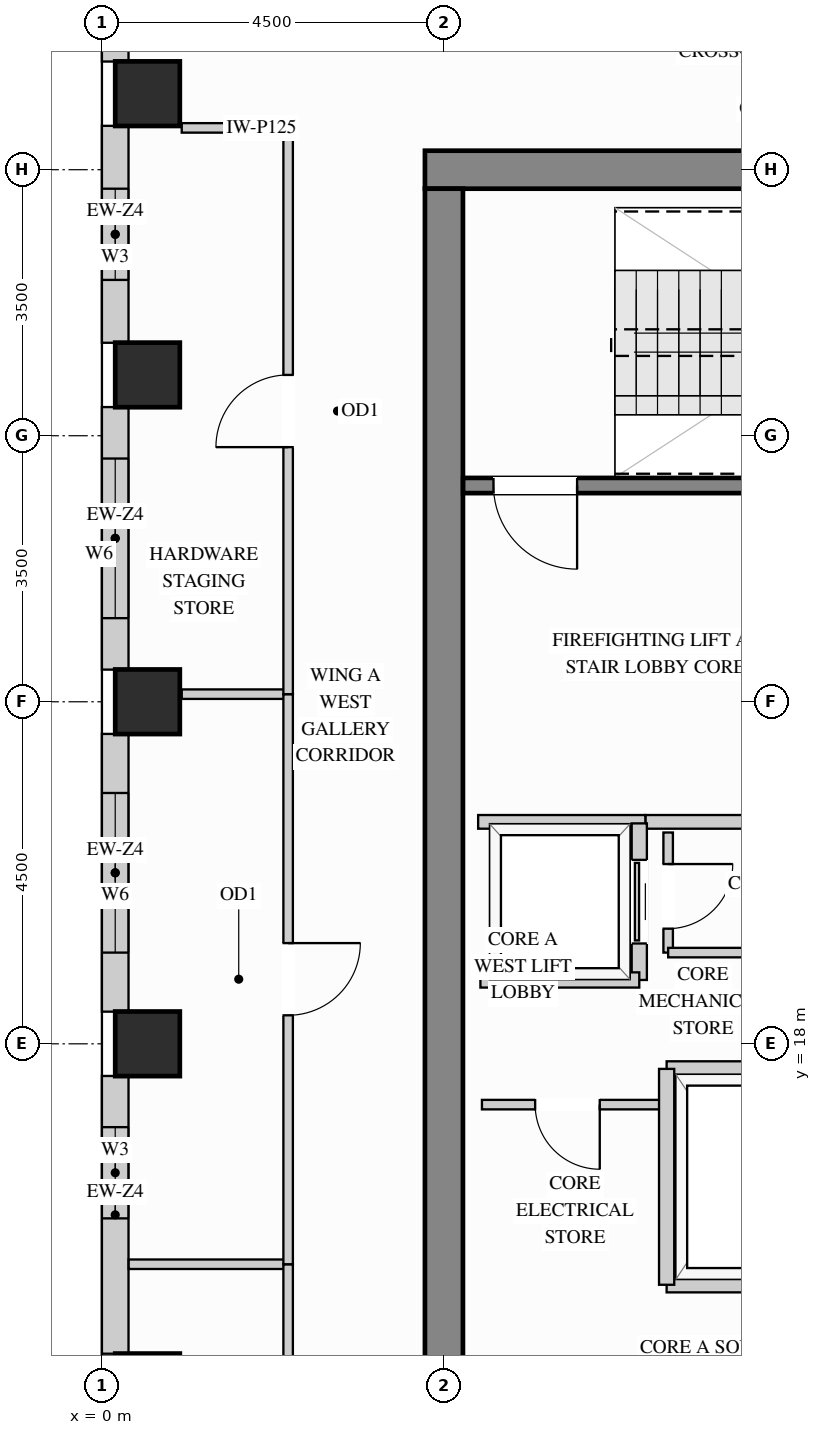
"""IFC4 building model, lengths in metres.
Left out: names, types, materials, properties, quantities, classifications, styles, units other than length and angle.
Written with IfcOpenShell. Run it as: python <this file> out.ifc"""

import sys

from ifc_helpers import new_model, si_unit, direction, frame, frame_2d, origin, origin_2d, place, context, subcontext, project, spatial, rectangle, extrude, source, transform, mapped, element, fill, save


model = new_model("IFC4")
c1 = context("Model", 3, precision=1e-05, world=origin(), true_north=direction((0.0, 1.0)))
c2 = subcontext(c1, "Body", "Model", "MODEL_VIEW")
j1 = project(units=[si_unit("LENGTHUNIT", "METRE"), si_unit("PLANEANGLEUNIT", "RADIAN")], contexts=[c1])
p1 = place(None, origin())
s1 = spatial("IfcSite", under=j1, at=p1, CompositionType="ELEMENT")
p2 = place(p1, origin())
s2 = spatial("IfcBuilding", under=s1, at=p2, CompositionType="ELEMENT")
p3 = place(p2, frame((0.0, 0.0, 273.6)))
s3 = spatial("IfcBuildingStorey", under=s2, at=p3, CompositionType="ELEMENT", Elevation=273.6)
m1 = source(origin(), c2, "Body", "SweptSolid", [
    extrude(rectangle(XDim=0.85, YDim=0.85, at=origin_2d()), origin(), (0.0, 0.0, 1.0), 3.37),
])
for number, where, z_axis, x_axis in (
    (1, (0.6, 13.5, 0.0), (0.0, 0.0, 1.0), (1.0, 0.0, 0.0)),
    (2, (0.6, 18.0, 0.0), (0.0, 0.0, 1.0), (1.0, 0.0, 0.0)),
    (3, (0.6, 22.5, 0.0), (0.0, 0.0, 1.0), (1.0, 0.0, 0.0)),
    (4, (0.6, 26.8, 0.0), (0.0, 0.0, 1.0), (1.0, 0.0, 0.0)),
    (5, (0.6, 30.5, 0.0), (0.0, 0.0, 1.0), (1.0, 0.0, 0.0)),
):
    element("IfcColumn", number, at=place(p3, frame(where, z_axis=z_axis, x_axis=x_axis)), inside=s3, PredefinedType="COLUMN", context=c2, shape_type="MappedRepresentation", body=[
        mapped(m1, transform((0.0, 0.0, 0.0), x_axis=(1.0, 0.0, 0.0), y_axis=(0.0, 1.0, 0.0), z_axis=(0.0, 0.0, 1.0))),
    ])
m2 = source(origin(), c2, "Body", "SweptSolid", [
    extrude(rectangle(XDim=10.5, YDim=0.5, at=frame_2d((5.25, 0.0))), origin(), (0.0, 0.0, 1.0), 3.37),
])
p4 = place(p3, frame((4.25, 29.5, 0.0), z_axis=(0.0, 0.0, 1.0), x_axis=(1.0, 0.0, 0.0)))
e6 = element("IfcWall", 6, at=p4, inside=s3, PredefinedType="SHEAR", context=c2, shape_type="MappedRepresentation", body=[
    mapped(m2, transform((0.0, 0.0, 0.0), x_axis=(1.0, 0.0, 0.0), y_axis=(0.0, 1.0, 0.0), z_axis=(0.0, 0.0, 1.0))),
])
m3 = source(origin(), c2, "Body", "SweptSolid", [
    extrude(rectangle(XDim=20.5, YDim=0.5, at=frame_2d((10.25, 0.0))), origin(), (0.0, 0.0, 1.0), 3.37),
])
p5 = place(p3, frame((4.5, 8.75, 0.0), z_axis=(0.0, 0.0, 1.0), x_axis=(0.0, 1.0, 0.0)))
e7 = element("IfcWall", 7, at=p5, inside=s3, PredefinedType="SHEAR", context=c2, shape_type="MappedRepresentation", body=[
    mapped(m3, transform((0.0, 0.0, 0.0), x_axis=(1.0, 0.0, 0.0), y_axis=(0.0, 1.0, 0.0), z_axis=(0.0, 0.0, 1.0))),
])
m4 = source(origin(), c2, "Body", "SweptSolid", [
    extrude(rectangle(XDim=0.527, YDim=0.35, at=frame_2d((0.263, 0.0))), origin(), (0.0, 0.0, 1.0), 3.355),
])
p6 = place(p3, frame((0.175, 31.45, 0.0), z_axis=(0.0, 0.0, 1.0), x_axis=(0.0, -1.0, 0.0)))
e8 = element("IfcWall", 8, at=p6, inside=s3, PredefinedType="SOLIDWALL", context=c2, shape_type="MappedRepresentation", body=[
    mapped(m4, transform((0.0, 0.0, 0.0), x_axis=(1.0, 0.0, 0.0), y_axis=(0.0, 1.0, 0.0), z_axis=(0.0, 0.0, 1.0))),
])
p7 = place(p3, frame((0.175, 30.077, 0.0), z_axis=(0.0, 0.0, 1.0), x_axis=(0.0, -1.0, 0.0)))
e9 = element("IfcWall", 9, at=p7, inside=s3, PredefinedType="SOLIDWALL", context=c2, shape_type="SweptSolid", body=[
    extrude(rectangle(XDim=2.854, YDim=0.35, at=frame_2d((1.427, 0.0))), origin(), (0.0, 0.0, 1.0), 3.355),
])
p8 = place(p7, frame((0.827, 0.0, 0.78)))
e10 = element("IfcOpeningElement", 10, at=p8, cuts=e9, PredefinedType="OPENING", context=c2, shape_type="SweptSolid", body=[
    extrude(rectangle(XDim=1.2, YDim=2.25, at=frame_2d((0.6, 1.125))), frame((0.0, 0.185, 0.0), z_axis=(0.0, -1.0, 0.0), x_axis=(1.0, 0.0, 0.0)), (0.0, 0.0, 1.0), 0.37),
])
p9 = place(p3, frame((0.175, 26.377, 0.0), z_axis=(0.0, 0.0, 1.0), x_axis=(0.0, -1.0, 0.0)))
e11 = element("IfcWall", 11, at=p9, inside=s3, PredefinedType="SOLIDWALL", context=c2, shape_type="SweptSolid", body=[
    extrude(rectangle(XDim=3.454, YDim=0.35, at=frame_2d((1.727, 0.0))), origin(), (0.0, 0.0, 1.0), 3.355),
])
p10 = place(p9, frame((0.677, 0.0, 0.78)))
e12 = element("IfcOpeningElement", 12, at=p10, cuts=e11, PredefinedType="OPENING", context=c2, shape_type="SweptSolid", body=[
    extrude(rectangle(XDim=2.1, YDim=2.25, at=frame_2d((1.05, 1.125))), frame((0.0, 0.185, 0.0), z_axis=(0.0, -1.0, 0.0), x_axis=(1.0, 0.0, 0.0)), (0.0, 0.0, 1.0), 0.37),
])
p11 = place(p3, frame((0.175, 22.077, 0.0), z_axis=(0.0, 0.0, 1.0), x_axis=(0.0, -1.0, 0.0)))
e13 = element("IfcWall", 13, at=p11, inside=s3, PredefinedType="SOLIDWALL", context=c2, shape_type="SweptSolid", body=[
    extrude(rectangle(XDim=3.654, YDim=0.35, at=frame_2d((1.827, 0.0))), origin(), (0.0, 0.0, 1.0), 3.355),
])
p12 = place(p11, frame((0.777, 0.0, 0.78)))
e14 = element("IfcOpeningElement", 14, at=p12, cuts=e13, PredefinedType="OPENING", context=c2, shape_type="SweptSolid", body=[
    extrude(rectangle(XDim=2.1, YDim=2.25, at=frame_2d((1.05, 1.125))), frame((0.0, 0.185, 0.0), z_axis=(0.0, -1.0, 0.0), x_axis=(1.0, 0.0, 0.0)), (0.0, 0.0, 1.0), 0.37),
])
p13 = place(p3, frame((0.175, 17.577, 0.0), z_axis=(0.0, 0.0, 1.0), x_axis=(0.0, -1.0, 0.0)))
e15 = element("IfcWall", 15, at=p13, inside=s3, PredefinedType="SOLIDWALL", context=c2, shape_type="SweptSolid", body=[
    extrude(rectangle(XDim=3.654, YDim=0.35, at=frame_2d((1.827, 0.0))), origin(), (0.0, 0.0, 1.0), 3.355),
])
p14 = place(p13, frame((0.674, 0.0, 0.78)))
e16 = element("IfcOpeningElement", 16, at=p14, cuts=e15, PredefinedType="OPENING", context=c2, shape_type="SweptSolid", body=[
    extrude(rectangle(XDim=1.2, YDim=2.25, at=frame_2d((0.6, 1.125))), frame((0.0, 0.185, 0.0), z_axis=(0.0, -1.0, 0.0), x_axis=(1.0, 0.0, 0.0)), (0.0, 0.0, 1.0), 0.37),
])
p15 = place(p3, frame((7.15, 20.92, 0.0), z_axis=(0.0, 0.0, 1.0), x_axis=(1.0, 0.0, 0.0)))
e17 = element("IfcWall", 17, at=p15, inside=s3, PredefinedType="PARTITIONING", context=c2, shape_type="SweptSolid", body=[
    extrude(rectangle(XDim=4.68, YDim=0.18, at=frame_2d((2.34, 0.0))), origin(), (0.0, 0.0, 1.0), 3.355),
])
p16 = place(p15, frame((2.2, 0.0, 0.0)))
e18 = element("IfcOpeningElement", 18, at=p16, cuts=e17, PredefinedType="OPENING", context=c2, shape_type="SweptSolid", body=[
    extrude(rectangle(XDim=1.1, YDim=2.15, at=frame_2d((0.55, 1.075))), frame((0.0, 0.1, 0.0), z_axis=(0.0, -1.0, 0.0), x_axis=(1.0, 0.0, 0.0)), (0.0, 0.0, 1.0), 0.2),
])
m5 = source(origin(), c2, "Body", "SweptSolid", [
    extrude(rectangle(XDim=2.2, YDim=0.18, at=frame_2d((1.1, 0.0))), origin(), (0.0, 0.0, 1.0), 3.355),
])
p17 = place(p3, frame((4.95, 20.92, 0.0), z_axis=(0.0, 0.0, 1.0), x_axis=(1.0, 0.0, 0.0)))
e19 = element("IfcWall", 19, at=p17, inside=s3, PredefinedType="PARTITIONING", context=c2, shape_type="MappedRepresentation", body=[
    mapped(m5, transform((0.0, 0.0, 0.0), x_axis=(1.0, 0.0, 0.0), y_axis=(0.0, 1.0, 0.0), z_axis=(0.0, 0.0, 1.0))),
])
p18 = place(p3, frame((7.45, 19.2, 0.0), z_axis=(0.0, 0.0, 1.0), x_axis=(0.0, 1.0, 0.0)))
e20 = element("IfcWall", 20, at=p18, inside=s3, PredefinedType="PARTITIONING", context=c2, shape_type="SweptSolid", body=[
    extrude(rectangle(XDim=1.58, YDim=0.125, at=frame_2d((0.79, 0.0))), origin(), (0.0, 0.0, 1.0), 3.355),
])
p19 = place(p18, frame((0.315, 0.0, 0.0)))
e21 = element("IfcOpeningElement", 21, at=p19, cuts=e20, PredefinedType="OPENING", context=c2, shape_type="SweptSolid", body=[
    extrude(rectangle(XDim=0.85, YDim=2.1, at=frame_2d((0.425, 1.05))), frame((0.0, 0.073, 0.0), z_axis=(0.0, -1.0, 0.0), x_axis=(1.0, 0.0, 0.0)), (0.0, 0.0, 1.0), 0.145),
])
m6 = source(origin(), c2, "Body", "SweptSolid", [
    extrude(rectangle(XDim=2.73, YDim=0.125, at=frame_2d((1.365, 0.0))), origin(), (0.0, 0.0, 1.0), 3.355),
])
p20 = place(p3, frame((7.45, 19.2, 0.0), z_axis=(0.0, 0.0, 1.0), x_axis=(1.0, 0.0, 0.0)))
e22 = element("IfcWall", 22, at=p20, inside=s3, PredefinedType="PARTITIONING", context=c2, shape_type="MappedRepresentation", body=[
    mapped(m6, transform((0.0, 0.0, 0.0), x_axis=(1.0, 0.0, 0.0), y_axis=(0.0, 1.0, 0.0), z_axis=(0.0, 0.0, 1.0))),
])
p21 = place(p3, frame((5.0, 17.2, 0.0), z_axis=(0.0, 0.0, 1.0), x_axis=(1.0, 0.0, 0.0)))
e23 = element("IfcWall", 23, at=p21, inside=s3, PredefinedType="PARTITIONING", context=c2, shape_type="SweptSolid", body=[
    extrude(rectangle(XDim=2.4, YDim=0.125, at=frame_2d((1.2, 0.0))), origin(), (0.0, 0.0, 1.0), 3.355),
])
p22 = place(p21, frame((0.7, 0.0, 0.0)))
e24 = element("IfcOpeningElement", 24, at=p22, cuts=e23, PredefinedType="OPENING", context=c2, shape_type="SweptSolid", body=[
    extrude(rectangle(XDim=0.85, YDim=2.1, at=frame_2d((0.425, 1.05))), frame((0.0, 0.073, 0.0), z_axis=(0.0, -1.0, 0.0), x_axis=(1.0, 0.0, 0.0)), (0.0, 0.0, 1.0), 0.145),
])
m7 = source(origin(), c2, "Body", "SweptSolid", [
    extrude(rectangle(XDim=1.4, YDim=0.125, at=frame_2d((0.7, 0.0))), origin(), (0.0, 0.0, 1.0), 3.355),
])
p23 = place(p3, frame((1.05, 30.05, 0.0), z_axis=(0.0, 0.0, 1.0), x_axis=(1.0, 0.0, 0.0)))
e25 = element("IfcWall", 25, at=p23, inside=s3, PredefinedType="PARTITIONING", context=c2, shape_type="MappedRepresentation", body=[
    mapped(m7, transform((0.0, 0.0, 0.0), x_axis=(1.0, 0.0, 0.0), y_axis=(0.0, 1.0, 0.0), z_axis=(0.0, 0.0, 1.0))),
])
m8 = source(origin(), c2, "Body", "SweptSolid", [
    extrude(rectangle(XDim=2.098, YDim=0.125, at=frame_2d((1.049, 0.0))), origin(), (0.0, 0.0, 1.0), 3.355),
])
p24 = place(p3, frame((0.352, 15.1, 0.0), z_axis=(0.0, 0.0, 1.0), x_axis=(1.0, 0.0, 0.0)))
e26 = element("IfcWall", 26, at=p24, inside=s3, PredefinedType="PARTITIONING", context=c2, shape_type="MappedRepresentation", body=[
    mapped(m8, transform((0.0, 0.0, 0.0), x_axis=(1.0, 0.0, 0.0), y_axis=(0.0, 1.0, 0.0), z_axis=(0.0, 0.0, 1.0))),
])
p25 = place(p3, frame((1.05, 22.6, 0.0), z_axis=(0.0, 0.0, 1.0), x_axis=(1.0, 0.0, 0.0)))
e27 = element("IfcWall", 27, at=p25, inside=s3, PredefinedType="PARTITIONING", context=c2, shape_type="MappedRepresentation", body=[
    mapped(m7, transform((0.0, 0.0, 0.0), x_axis=(1.0, 0.0, 0.0), y_axis=(0.0, 1.0, 0.0), z_axis=(0.0, 0.0, 1.0))),
])
p26 = place(p3, frame((2.45, 7.85, 0.0), z_axis=(0.0, 0.0, 1.0), x_axis=(0.0, 1.0, 0.0)))
e28 = element("IfcWall", 28, at=p26, inside=s3, PredefinedType="PARTITIONING", context=c2, shape_type="SweptSolid", body=[
    extrude(rectangle(XDim=7.25, YDim=0.125, at=frame_2d((3.625, 0.0))), origin(), (0.0, 0.0, 1.0), 3.355),
])
p27 = place(p26, frame((3.15, 0.0, 0.0)))
e29 = element("IfcOpeningElement", 29, at=p27, cuts=e28, PredefinedType="OPENING", context=c2, shape_type="SweptSolid", body=[
    extrude(rectangle(XDim=0.95, YDim=2.15, at=frame_2d((0.475, 1.075))), frame((0.0, 0.073, 0.0), z_axis=(0.0, -1.0, 0.0), x_axis=(1.0, 0.0, 0.0)), (0.0, 0.0, 1.0), 0.145),
])
p28 = place(p3, frame((2.45, 15.1, 0.0), z_axis=(0.0, 0.0, 1.0), x_axis=(0.0, 1.0, 0.0)))
e30 = element("IfcWall", 30, at=p28, inside=s3, PredefinedType="PARTITIONING", context=c2, shape_type="SweptSolid", body=[
    extrude(rectangle(XDim=7.5, YDim=0.125, at=frame_2d((3.75, 0.0))), origin(), (0.0, 0.0, 1.0), 3.355),
])
p29 = place(p28, frame((3.275, 0.0, 0.0)))
e31 = element("IfcOpeningElement", 31, at=p29, cuts=e30, PredefinedType="OPENING", context=c2, shape_type="SweptSolid", body=[
    extrude(rectangle(XDim=0.95, YDim=2.15, at=frame_2d((0.475, 1.075))), frame((0.0, 0.073, 0.0), z_axis=(0.0, -1.0, 0.0), x_axis=(1.0, 0.0, 0.0)), (0.0, 0.0, 1.0), 0.145),
])
p30 = place(p3, frame((2.45, 22.6, 0.0), z_axis=(0.0, 0.0, 1.0), x_axis=(0.0, 1.0, 0.0)))
e32 = element("IfcWall", 32, at=p30, inside=s3, PredefinedType="PARTITIONING", context=c2, shape_type="SweptSolid", body=[
    extrude(rectangle(XDim=7.45, YDim=0.125, at=frame_2d((3.725, 0.0))), origin(), (0.0, 0.0, 1.0), 3.355),
])
p31 = place(p30, frame((3.25, 0.0, 0.0)))
e33 = element("IfcOpeningElement", 33, at=p31, cuts=e32, PredefinedType="OPENING", context=c2, shape_type="SweptSolid", body=[
    extrude(rectangle(XDim=0.95, YDim=2.15, at=frame_2d((0.475, 1.075))), frame((0.0, 0.073, 0.0), z_axis=(0.0, -1.0, 0.0), x_axis=(1.0, 0.0, 0.0)), (0.0, 0.0, 1.0), 0.145),
])
p32 = place(p3, frame((7.07, 18.84, 0.0), z_axis=(0.0, 0.0, 1.0), x_axis=(0.0, 1.0, 0.0)))
e34 = element("IfcWall", 34, at=p32, inside=s3, PredefinedType="PARTITIONING", context=c2, shape_type="SweptSolid", body=[
    extrude(rectangle(XDim=2.06, YDim=0.2, at=frame_2d((1.03, 0.0))), origin(), (0.0, 0.0, 1.0), 3.355),
])
p33 = place(p32, frame((0.48, 0.0, 0.0)))
e35 = element("IfcOpeningElement", 35, at=p33, cuts=e34, PredefinedType="OPENING", context=c2, shape_type="SweptSolid", body=[
    extrude(rectangle(XDim=1.1, YDim=2.2, at=frame_2d((0.55, 1.1))), frame((0.0, 0.11, 0.0), z_axis=(0.0, -1.0, 0.0), x_axis=(1.0, 0.0, 0.0)), (0.0, 0.0, 1.0), 0.22),
])
m9 = source(origin(), c2, "Body", "SweptSolid", [
    extrude(rectangle(XDim=2.09, YDim=0.2, at=frame_2d((1.045, 0.0))), origin(), (0.0, 0.0, 1.0), 3.355),
])
p34 = place(p3, frame((4.98, 18.84, 0.0), z_axis=(0.0, 0.0, 1.0), x_axis=(1.0, 0.0, 0.0)))
e36 = element("IfcWall", 36, at=p34, inside=s3, PredefinedType="PARTITIONING", context=c2, shape_type="MappedRepresentation", body=[
    mapped(m9, transform((0.0, 0.0, 0.0), x_axis=(1.0, 0.0, 0.0), y_axis=(0.0, 1.0, 0.0), z_axis=(0.0, 0.0, 1.0))),
])
m10 = source(origin(), c2, "Body", "SweptSolid", [
    extrude(rectangle(XDim=2.04, YDim=0.2, at=frame_2d((1.02, 0.0))), origin(), (0.0, 0.0, 1.0), 2.355),
])
p35 = place(p3, frame((7.43, 17.67, 0.0), z_axis=(0.0, 0.0, 1.0), x_axis=(1.0, 0.0, 0.0)))
e37 = element("IfcWall", 37, at=p35, inside=s3, PredefinedType="PARTITIONING", context=c2, shape_type="MappedRepresentation", body=[
    mapped(m10, transform((0.0, 0.0, 0.0), x_axis=(1.0, 0.0, 0.0), y_axis=(0.0, 1.0, 0.0), z_axis=(0.0, 0.0, 1.0))),
])
m11 = source(origin(), c2, "Body", "SweptSolid", [
    extrude(rectangle(XDim=2.04, YDim=0.2, at=frame_2d((1.02, 0.0))), origin(), (0.0, 0.0, 1.0), 3.355),
])
p36 = place(p3, frame((7.43, 14.83, 0.0), z_axis=(0.0, 0.0, 1.0), x_axis=(1.0, 0.0, 0.0)))
e38 = element("IfcWall", 38, at=p36, inside=s3, PredefinedType="PARTITIONING", context=c2, shape_type="MappedRepresentation", body=[
    mapped(m11, transform((0.0, 0.0, 0.0), x_axis=(1.0, 0.0, 0.0), y_axis=(0.0, 1.0, 0.0), z_axis=(0.0, 0.0, 1.0))),
])
m12 = source(origin(), c2, "Body", "SweptSolid", [
    extrude(rectangle(XDim=2.84, YDim=0.2, at=frame_2d((1.42, 0.0))), origin(), (0.0, 0.0, 1.0), 3.355),
])
p37 = place(p3, frame((7.43, 14.83, 0.0), z_axis=(0.0, 0.0, 1.0), x_axis=(0.0, 1.0, 0.0)))
e39 = element("IfcWall", 39, at=p37, inside=s3, PredefinedType="PARTITIONING", context=c2, shape_type="MappedRepresentation", body=[
    mapped(m12, transform((0.0, 0.0, 0.0), x_axis=(1.0, 0.0, 0.0), y_axis=(0.0, 1.0, 0.0), z_axis=(0.0, 0.0, 1.0))),
])
p38 = place(p3, frame((4.752, 25.345, 0.0), z_axis=(0.0, 0.0, 1.0), x_axis=(1.0, 0.0, 0.0)))
e40 = element("IfcWall", 40, at=p38, inside=s3, PredefinedType="SHEAR", context=c2, shape_type="SweptSolid", body=[
    extrude(rectangle(XDim=7.653, YDim=0.2, at=frame_2d((3.827, 0.0))), origin(), (0.0, 0.0, 1.0), 3.37),
])
p39 = place(p38, frame((0.4, 0.0, 0.0)))
e41 = element("IfcOpeningElement", 41, at=p39, cuts=e40, PredefinedType="OPENING", context=c2, shape_type="SweptSolid", body=[
    extrude(rectangle(XDim=1.1, YDim=2.15, at=frame_2d((0.55, 1.075))), frame((0.0, 0.11, 0.0), z_axis=(0.0, -1.0, 0.0), x_axis=(1.0, 0.0, 0.0)), (0.0, 0.0, 1.0), 0.22),
])
m13 = source(origin(), c2, "Body", "SweptSolid", [
    extrude(rectangle(XDim=1.1, YDim=2.2, at=frame_2d((0.55, 1.1))), frame((0.0, 0.025, 0.0), z_axis=(0.0, -1.0, 0.0), x_axis=(1.0, 0.0, 0.0)), (0.0, 0.0, 1.0), 0.05),
])
p40 = place(p33, origin())
e42 = element("IfcDoor", 42, at=p40, inside=s3, OperationType="SLIDING_TO_LEFT", PredefinedType="DOOR", context=c2, shape_type="MappedRepresentation", body=[
    mapped(m13, transform((0.0, 0.0, 0.0), x_axis=(1.0, 0.0, 0.0), y_axis=(0.0, 1.0, 0.0), z_axis=(0.0, 0.0, 1.0))),
])
fill(e35, e42)
m14 = source(origin(), c2, "Body", "SweptSolid", [
    extrude(rectangle(XDim=0.95, YDim=2.15, at=frame_2d((0.475, 1.075))), frame((0.0, 0.025, 0.0), z_axis=(0.0, -1.0, 0.0), x_axis=(1.0, 0.0, 0.0)), (0.0, 0.0, 1.0), 0.05),
])
p41 = place(p29, origin())
e43 = element("IfcDoor", 43, at=p41, inside=s3, OperationType="SINGLE_SWING_RIGHT", PredefinedType="DOOR", context=c2, shape_type="MappedRepresentation", body=[
    mapped(m14, transform((0.0, 0.0, 0.0), x_axis=(1.0, 0.0, 0.0), y_axis=(0.0, 1.0, 0.0), z_axis=(0.0, 0.0, 1.0))),
])
fill(e31, e43)
p42 = place(p31, origin())
e44 = element("IfcDoor", 44, at=p42, inside=s3, OperationType="SINGLE_SWING_LEFT", PredefinedType="DOOR", context=c2, shape_type="MappedRepresentation", body=[
    mapped(m14, transform((0.0, 0.0, 0.0), x_axis=(1.0, 0.0, 0.0), y_axis=(0.0, 1.0, 0.0), z_axis=(0.0, 0.0, 1.0))),
])
fill(e33, e44)
m15 = source(origin(), c2, "Body", "SweptSolid", [
    extrude(rectangle(XDim=0.85, YDim=2.1, at=frame_2d((0.425, 1.05))), frame((0.0, 0.025, 0.0), z_axis=(0.0, -1.0, 0.0), x_axis=(1.0, 0.0, 0.0)), (0.0, 0.0, 1.0), 0.05),
])
p43 = place(p22, origin())
e45 = element("IfcDoor", 45, at=p43, inside=s3, OperationType="SINGLE_SWING_RIGHT", PredefinedType="DOOR", context=c2, shape_type="MappedRepresentation", body=[
    mapped(m15, transform((0.0, 0.0, 0.0), x_axis=(1.0, 0.0, 0.0), y_axis=(0.0, 1.0, 0.0), z_axis=(0.0, 0.0, 1.0))),
])
fill(e24, e45)
p44 = place(p19, origin())
e46 = element("IfcDoor", 46, at=p44, inside=s3, OperationType="SINGLE_SWING_RIGHT", PredefinedType="DOOR", context=c2, shape_type="MappedRepresentation", body=[
    mapped(m15, transform((0.0, 0.0, 0.0), x_axis=(1.0, 0.0, 0.0), y_axis=(0.0, 1.0, 0.0), z_axis=(0.0, 0.0, 1.0))),
])
fill(e21, e46)
m16 = source(origin(), c2, "Body", "SweptSolid", [
    extrude(rectangle(XDim=1.1, YDim=2.15, at=frame_2d((0.55, 1.075))), frame((0.0, 0.025, 0.0), z_axis=(0.0, -1.0, 0.0), x_axis=(1.0, 0.0, 0.0)), (0.0, 0.0, 1.0), 0.05),
])
p45 = place(p39, origin())
e47 = element("IfcDoor", 47, at=p45, inside=s3, OperationType="SINGLE_SWING_RIGHT", PredefinedType="DOOR", context=c2, shape_type="MappedRepresentation", body=[
    mapped(m16, transform((0.0, 0.0, 0.0), x_axis=(1.0, 0.0, 0.0), y_axis=(0.0, 1.0, 0.0), z_axis=(0.0, 0.0, 1.0))),
])
fill(e41, e47)
m17 = source(origin(), c2, "Body", "SweptSolid", [
    extrude(rectangle(XDim=1.2, YDim=2.25, at=frame_2d((0.6, 1.125))), frame((0.0, 0.03, 0.0), z_axis=(0.0, -1.0, 0.0), x_axis=(1.0, 0.0, 0.0)), (0.0, 0.0, 1.0), 0.06),
])
p46 = place(p8, origin())
e48 = element("IfcWindow", 48, at=p46, inside=s3, PartitioningType="SINGLE_PANEL", PredefinedType="WINDOW", context=c2, shape_type="MappedRepresentation", body=[
    mapped(m17, transform((0.0, 0.0, 0.0), x_axis=(1.0, 0.0, 0.0), y_axis=(0.0, 1.0, 0.0), z_axis=(0.0, 0.0, 1.0))),
])
fill(e10, e48)
p47 = place(p14, origin())
e49 = element("IfcWindow", 49, at=p47, inside=s3, PartitioningType="SINGLE_PANEL", PredefinedType="WINDOW", context=c2, shape_type="MappedRepresentation", body=[
    mapped(m17, transform((0.0, 0.0, 0.0), x_axis=(1.0, 0.0, 0.0), y_axis=(0.0, 1.0, 0.0), z_axis=(0.0, 0.0, 1.0))),
])
fill(e16, e49)
m18 = source(origin(), c2, "Body", "SweptSolid", [
    extrude(rectangle(XDim=2.1, YDim=2.25, at=frame_2d((1.05, 1.125))), frame((0.0, 0.03, 0.0), z_axis=(0.0, -1.0, 0.0), x_axis=(1.0, 0.0, 0.0)), (0.0, 0.0, 1.0), 0.06),
])
p48 = place(p10, origin())
e50 = element("IfcWindow", 50, at=p48, inside=s3, PartitioningType="SINGLE_PANEL", PredefinedType="WINDOW", context=c2, shape_type="MappedRepresentation", body=[
    mapped(m18, transform((0.0, 0.0, 0.0), x_axis=(1.0, 0.0, 0.0), y_axis=(0.0, 1.0, 0.0), z_axis=(0.0, 0.0, 1.0))),
])
fill(e12, e50)
p49 = place(p12, origin())
e51 = element("IfcWindow", 51, at=p49, inside=s3, PartitioningType="SINGLE_PANEL", PredefinedType="WINDOW", context=c2, shape_type="MappedRepresentation", body=[
    mapped(m18, transform((0.0, 0.0, 0.0), x_axis=(1.0, 0.0, 0.0), y_axis=(0.0, 1.0, 0.0), z_axis=(0.0, 0.0, 1.0))),
])
fill(e14, e51)
save(model, sys.argv[1])
